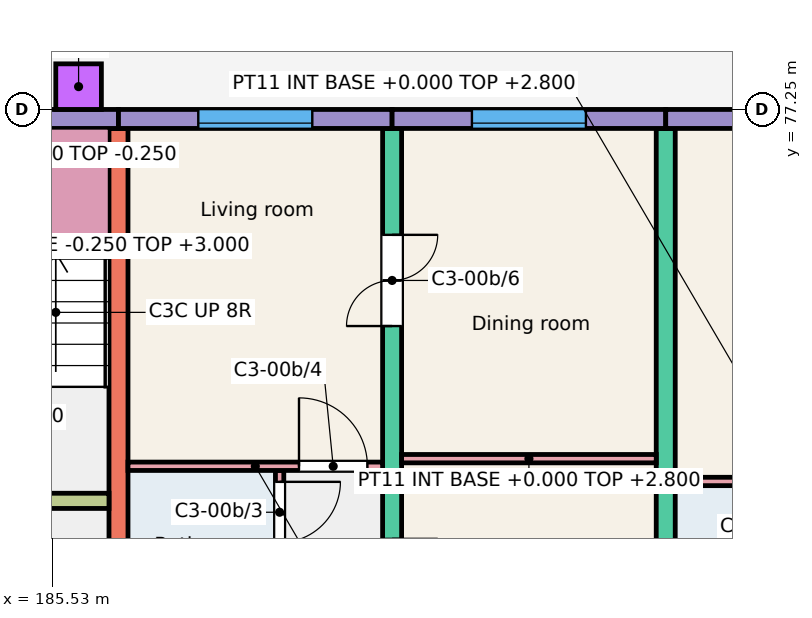
"""IFC4 building model, lengths in metres.
Left out: names, types, materials, properties, quantities, classifications, styles, units other than length and angle.
Written with IfcOpenShell. Run it as: python <this file> out.ifc"""

import sys

from ifc_helpers import new_model, si_unit, direction, frame, frame_2d, origin, origin_2d, place, context, subcontext, project, spatial, rectangle, extrude, element, fill, save


model = new_model("IFC4")
c1 = context("Model", 3, precision=1e-05, world=origin(), true_north=direction((0.0, 1.0)))
c2 = subcontext(c1, "Body", "Model", "MODEL_VIEW")
j1 = project(units=[si_unit("LENGTHUNIT", "METRE"), si_unit("PLANEANGLEUNIT", "RADIAN")], contexts=[c1])
p1 = place(None, origin())
s1 = spatial("IfcSite", under=j1, at=p1, CompositionType="ELEMENT")
p2 = place(p1, origin())
s2 = spatial("IfcBuilding", under=s1, at=p2, CompositionType="ELEMENT")
p3 = place(p2, origin())
s3 = spatial("IfcBuildingStorey", under=s2, at=p3, CompositionType="ELEMENT", Elevation=0.0)
p4 = place(p3, frame((186.4, 68.0, -0.25), z_axis=(0.0, 0.0, 1.0), x_axis=(0.0, 1.0, 0.0)))
e1 = element("IfcWall", 1, at=p4, inside=s3, PredefinedType="SHEAR", context=c2, shape_type="SweptSolid", body=[
    extrude(rectangle(XDim=9.0, YDim=0.25, at=frame_2d((4.5, 0.0))), origin(), (0.0, 0.0, 1.0), 3.25),
])
p5 = place(p3, frame((190.0, 68.0, -0.25), z_axis=(0.0, 0.0, 1.0), x_axis=(0.0, 1.0, 0.0)))
e2 = element("IfcWall", 2, at=p5, inside=s3, PredefinedType="SHEAR", context=c2, shape_type="SweptSolid", body=[
    extrude(rectangle(XDim=9.0, YDim=0.25, at=frame_2d((4.5, 0.0))), origin(), (0.0, 0.0, 1.0), 3.25),
])
p6 = place(p5, frame((2.4, 0.0, 0.25)))
e3 = element("IfcOpeningElement", 3, at=p6, cuts=e2, PredefinedType="OPENING", context=c2, shape_type="SweptSolid", body=[
    extrude(rectangle(XDim=1.2, YDim=2.1, at=frame_2d((0.6, 1.05))), frame((0.0, 0.135, 0.0), z_axis=(0.0, -1.0, 0.0), x_axis=(1.0, 0.0, 0.0)), (0.0, 0.0, 1.0), 0.27),
])
p7 = place(p5, frame((6.4, 0.0, 0.25)))
e4 = element("IfcOpeningElement", 4, at=p7, cuts=e2, PredefinedType="OPENING", context=c2, shape_type="SweptSolid", body=[
    extrude(rectangle(XDim=1.2, YDim=2.1, at=frame_2d((0.6, 1.05))), frame((0.0, 0.135, 0.0), z_axis=(0.0, -1.0, 0.0), x_axis=(1.0, 0.0, 0.0)), (0.0, 0.0, 1.0), 0.27),
])
p8 = place(p3, frame((193.6, 68.0, -0.25), z_axis=(0.0, 0.0, 1.0), x_axis=(0.0, 1.0, 0.0)))
e5 = element("IfcWall", 5, at=p8, inside=s3, PredefinedType="SHEAR", context=c2, shape_type="SweptSolid", body=[
    extrude(rectangle(XDim=9.0, YDim=0.25, at=frame_2d((4.5, 0.0))), origin(), (0.0, 0.0, 1.0), 3.25),
])
p9 = place(p3, frame((180.4, 77.125, -0.25), z_axis=(0.0, 0.0, 1.0), x_axis=(1.0, 0.0, 0.0)))
e6 = element("IfcWall", 6, at=p9, inside=s3, PredefinedType="SOLIDWALL", context=c2, shape_type="SweptSolid", body=[
    extrude(rectangle(XDim=6.0, YDim=0.25, at=frame_2d((3.0, 0.0))), origin(), (0.0, 0.0, 1.0), 3.25),
])
p10 = place(p9, frame((3.875, 0.0, 0.25)))
e7 = element("IfcOpeningElement", 7, at=p10, cuts=e6, PredefinedType="OPENING", context=c2, shape_type="SweptSolid", body=[
    extrude(rectangle(XDim=1.1, YDim=2.1, at=frame_2d((0.55, 1.05))), frame((0.0, 0.135, 0.0), z_axis=(0.0, -1.0, 0.0), x_axis=(1.0, 0.0, 0.0)), (0.0, 0.0, 1.0), 0.27),
])
p11 = place(p3, frame((180.55, 72.1, -0.25), z_axis=(0.0, 0.0, 1.0), x_axis=(1.0, 0.0, 0.0)))
e8 = element("IfcWall", 8, at=p11, inside=s3, PredefinedType="SHEAR", context=c2, shape_type="SweptSolid", body=[
    extrude(rectangle(XDim=5.725, YDim=0.2, at=frame_2d((2.862, 0.0))), origin(), (0.0, 0.0, 1.0), 3.25),
])
p12 = place(p11, frame((3.775, 0.0, 0.25)))
e9 = element("IfcOpeningElement", 9, at=p12, cuts=e8, PredefinedType="OPENING", context=c2, shape_type="SweptSolid", body=[
    extrude(rectangle(XDim=1.0, YDim=2.1, at=frame_2d((0.5, 1.05))), frame((0.0, 0.11, 0.0), z_axis=(0.0, -1.0, 0.0), x_axis=(1.0, 0.0, 0.0)), (0.0, 0.0, 1.0), 0.22),
])
p13 = place(p11, frame((0.762, 0.0, 0.25)))
e10 = element("IfcOpeningElement", 10, at=p13, cuts=e8, PredefinedType="OPENING", context=c2, shape_type="SweptSolid", body=[
    extrude(rectangle(XDim=1.1, YDim=2.1, at=frame_2d((0.55, 1.05))), frame((0.0, 0.11, 0.0), z_axis=(0.0, -1.0, 0.0), x_axis=(1.0, 0.0, 0.0)), (0.0, 0.0, 1.0), 0.22),
])
p14 = place(p3, frame((186.4, 77.125, -0.25), z_axis=(0.0, 0.0, 1.0), x_axis=(1.0, 0.0, 0.0)))
e11 = element("IfcWall", 11, at=p14, inside=s3, PredefinedType="SOLIDWALL", context=c2, shape_type="SweptSolid", body=[
    extrude(rectangle(XDim=3.6, YDim=0.25, at=frame_2d((1.8, 0.0))), origin(), (0.0, 0.0, 1.0), 3.25),
])
p15 = place(p14, frame((1.05, 0.0, 1.15)))
e12 = element("IfcOpeningElement", 12, at=p15, cuts=e11, PredefinedType="OPENING", context=c2, shape_type="SweptSolid", body=[
    extrude(rectangle(XDim=1.5, YDim=1.5, at=frame_2d((0.75, 0.75))), frame((0.0, 0.135, 0.0), z_axis=(0.0, -1.0, 0.0), x_axis=(1.0, 0.0, 0.0)), (0.0, 0.0, 1.0), 0.27),
])
p16 = place(p3, frame((190.0, 77.125, -0.25), z_axis=(0.0, 0.0, 1.0), x_axis=(1.0, 0.0, 0.0)))
e13 = element("IfcWall", 13, at=p16, inside=s3, PredefinedType="SOLIDWALL", context=c2, shape_type="SweptSolid", body=[
    extrude(rectangle(XDim=3.6, YDim=0.25, at=frame_2d((1.8, 0.0))), origin(), (0.0, 0.0, 1.0), 3.25),
])
p17 = place(p16, frame((1.05, 0.0, 1.15)))
e14 = element("IfcOpeningElement", 14, at=p17, cuts=e13, PredefinedType="OPENING", context=c2, shape_type="SweptSolid", body=[
    extrude(rectangle(XDim=1.5, YDim=1.5, at=frame_2d((0.75, 0.75))), frame((0.0, 0.135, 0.0), z_axis=(0.0, -1.0, 0.0), x_axis=(1.0, 0.0, 0.0)), (0.0, 0.0, 1.0), 0.27),
])
p18 = place(p3, frame((193.6, 77.125, -0.25), z_axis=(0.0, 0.0, 1.0), x_axis=(1.0, 0.0, 0.0)))
e15 = element("IfcWall", 15, at=p18, inside=s3, PredefinedType="SOLIDWALL", context=c2, shape_type="SweptSolid", body=[
    extrude(rectangle(XDim=3.6, YDim=0.25, at=frame_2d((1.8, 0.0))), origin(), (0.0, 0.0, 1.0), 3.25),
])
p19 = place(p18, frame((1.038, 0.0, 1.15)))
e16 = element("IfcOpeningElement", 16, at=p19, cuts=e15, PredefinedType="OPENING", context=c2, shape_type="SweptSolid", body=[
    extrude(rectangle(XDim=1.5, YDim=1.5, at=frame_2d((0.75, 0.75))), frame((0.0, 0.135, 0.0), z_axis=(0.0, -1.0, 0.0), x_axis=(1.0, 0.0, 0.0)), (0.0, 0.0, 1.0), 0.27),
])
p20 = place(p3, frame((185.875, 77.55, -0.25), z_axis=(0.0, 0.0, 1.0), x_axis=(1.0, 0.0, 0.0)))
e17 = element("IfcColumn", 17, at=p20, inside=s3, PredefinedType="COLUMN", context=c2, shape_type="SweptSolid", body=[
    extrude(rectangle(XDim=0.6, YDim=0.6, at=origin_2d()), origin(), (0.0, 0.0, 1.0), 3.15),
])
p21 = place(p3, frame((193.725, 72.355, 0.0), z_axis=(0.0, 0.0, 1.0), x_axis=(1.0, 0.0, 0.0)))
e18 = element("IfcWall", 18, at=p21, inside=s3, PredefinedType="PARTITIONING", context=c2, shape_type="SweptSolid", body=[
    extrude(rectangle(XDim=3.325, YDim=0.11, at=frame_2d((1.663, 0.0))), origin(), (0.0, 0.0, 1.0), 2.8),
])
p22 = place(p21, frame((2.225, 0.0, 0.0)))
e19 = element("IfcOpeningElement", 19, at=p22, cuts=e18, PredefinedType="OPENING", context=c2, shape_type="SweptSolid", body=[
    extrude(rectangle(XDim=0.9, YDim=2.1, at=frame_2d((0.45, 1.05))), frame((0.0, 0.065, 0.0), z_axis=(0.0, -1.0, 0.0), x_axis=(1.0, 0.0, 0.0)), (0.0, 0.0, 1.0), 0.13),
])
p23 = place(p3, frame((188.52, 68.0, 0.0), z_axis=(0.0, 0.0, 1.0), x_axis=(0.0, 1.0, 0.0)))
e20 = element("IfcWall", 20, at=p23, inside=s3, PredefinedType="PARTITIONING", context=c2, shape_type="SweptSolid", body=[
    extrude(rectangle(XDim=4.5, YDim=0.11, at=frame_2d((2.25, 0.0))), origin(), (0.0, 0.0, 1.0), 2.8),
])
p24 = place(p23, frame((0.2, 0.0, 0.0)))
e21 = element("IfcOpeningElement", 21, at=p24, cuts=e20, PredefinedType="OPENING", context=c2, shape_type="SweptSolid", body=[
    extrude(rectangle(XDim=0.8, YDim=2.1, at=frame_2d((0.4, 1.05))), frame((0.0, 0.065, 0.0), z_axis=(0.0, -1.0, 0.0), x_axis=(1.0, 0.0, 0.0)), (0.0, 0.0, 1.0), 0.13),
])
p25 = place(p23, frame((3.55, 0.0, 0.0)))
e22 = element("IfcOpeningElement", 22, at=p25, cuts=e20, PredefinedType="OPENING", context=c2, shape_type="SweptSolid", body=[
    extrude(rectangle(XDim=0.8, YDim=2.1, at=frame_2d((0.4, 1.05))), frame((0.0, 0.065, 0.0), z_axis=(0.0, -1.0, 0.0), x_axis=(1.0, 0.0, 0.0)), (0.0, 0.0, 1.0), 0.13),
])
p26 = place(p3, frame((186.525, 72.555, 0.0), z_axis=(0.0, 0.0, 1.0), x_axis=(1.0, 0.0, 0.0)))
e23 = element("IfcWall", 23, at=p26, inside=s3, PredefinedType="PARTITIONING", context=c2, shape_type="SweptSolid", body=[
    extrude(rectangle(XDim=3.35, YDim=0.11, at=frame_2d((1.675, 0.0))), origin(), (0.0, 0.0, 1.0), 2.8),
])
p27 = place(p26, frame((2.25, 0.0, 0.0)))
e24 = element("IfcOpeningElement", 24, at=p27, cuts=e23, PredefinedType="OPENING", context=c2, shape_type="SweptSolid", body=[
    extrude(rectangle(XDim=0.9, YDim=2.1, at=frame_2d((0.45, 1.05))), frame((0.0, 0.065, 0.0), z_axis=(0.0, -1.0, 0.0), x_axis=(1.0, 0.0, 0.0)), (0.0, 0.0, 1.0), 0.13),
])
p28 = place(p3, frame((190.125, 72.655, 0.0), z_axis=(0.0, 0.0, 1.0), x_axis=(1.0, 0.0, 0.0)))
e25 = element("IfcWall", 25, at=p28, inside=s3, PredefinedType="PARTITIONING", context=c2, shape_type="SweptSolid", body=[
    extrude(rectangle(XDim=3.35, YDim=0.11, at=frame_2d((1.675, 0.0))), origin(), (0.0, 0.0, 1.0), 2.8),
])
p29 = place(p17, origin())
e26 = element("IfcWindow", 26, at=p29, inside=s3, PartitioningType="SINGLE_PANEL", PredefinedType="WINDOW", context=c2, shape_type="SweptSolid", body=[
    extrude(rectangle(XDim=1.5, YDim=1.5, at=frame_2d((0.75, 0.75))), frame((0.0, -0.025, 0.0), z_axis=(0.0, -1.0, 0.0), x_axis=(1.0, 0.0, 0.0)), (0.0, 0.0, 1.0), 0.06),
])
fill(e14, e26)
p30 = place(p15, origin())
e27 = element("IfcWindow", 27, at=p30, inside=s3, PartitioningType="SINGLE_PANEL", PredefinedType="WINDOW", context=c2, shape_type="SweptSolid", body=[
    extrude(rectangle(XDim=1.5, YDim=1.5, at=frame_2d((0.75, 0.75))), frame((0.0, -0.025, 0.0), z_axis=(0.0, -1.0, 0.0), x_axis=(1.0, 0.0, 0.0)), (0.0, 0.0, 1.0), 0.06),
])
fill(e12, e27)
p31 = place(p25, origin())
e28 = element("IfcDoor", 28, at=p31, inside=s3, OperationType="SINGLE_SWING_RIGHT", PredefinedType="DOOR", context=c2, shape_type="SweptSolid", body=[
    extrude(rectangle(XDim=0.8, YDim=2.1, at=frame_2d((0.4, 1.05))), frame((0.0, 0.025, 0.0), z_axis=(0.0, -1.0, 0.0), x_axis=(1.0, 0.0, 0.0)), (0.0, 0.0, 1.0), 0.05),
])
fill(e22, e28)
p32 = place(p27, origin())
e29 = element("IfcDoor", 29, at=p32, inside=s3, OperationType="SINGLE_SWING_LEFT", PredefinedType="DOOR", context=c2, shape_type="SweptSolid", body=[
    extrude(rectangle(XDim=0.9, YDim=2.1, at=frame_2d((0.45, 1.05))), frame((0.0, 0.025, 0.0), z_axis=(0.0, -1.0, 0.0), x_axis=(1.0, 0.0, 0.0)), (0.0, 0.0, 1.0), 0.05),
])
fill(e24, e29)
p33 = place(p7, origin())
e30 = element("IfcDoor", 30, at=p33, inside=s3, OperationType="DOUBLE_DOOR_SINGLE_SWING", PredefinedType="DOOR", context=c2, shape_type="SweptSolid", body=[
    extrude(rectangle(XDim=1.2, YDim=2.1, at=frame_2d((0.6, 1.05))), frame((0.0, 0.025, 0.0), z_axis=(0.0, -1.0, 0.0), x_axis=(1.0, 0.0, 0.0)), (0.0, 0.0, 1.0), 0.05),
])
fill(e4, e30)
save(model, sys.argv[1])
